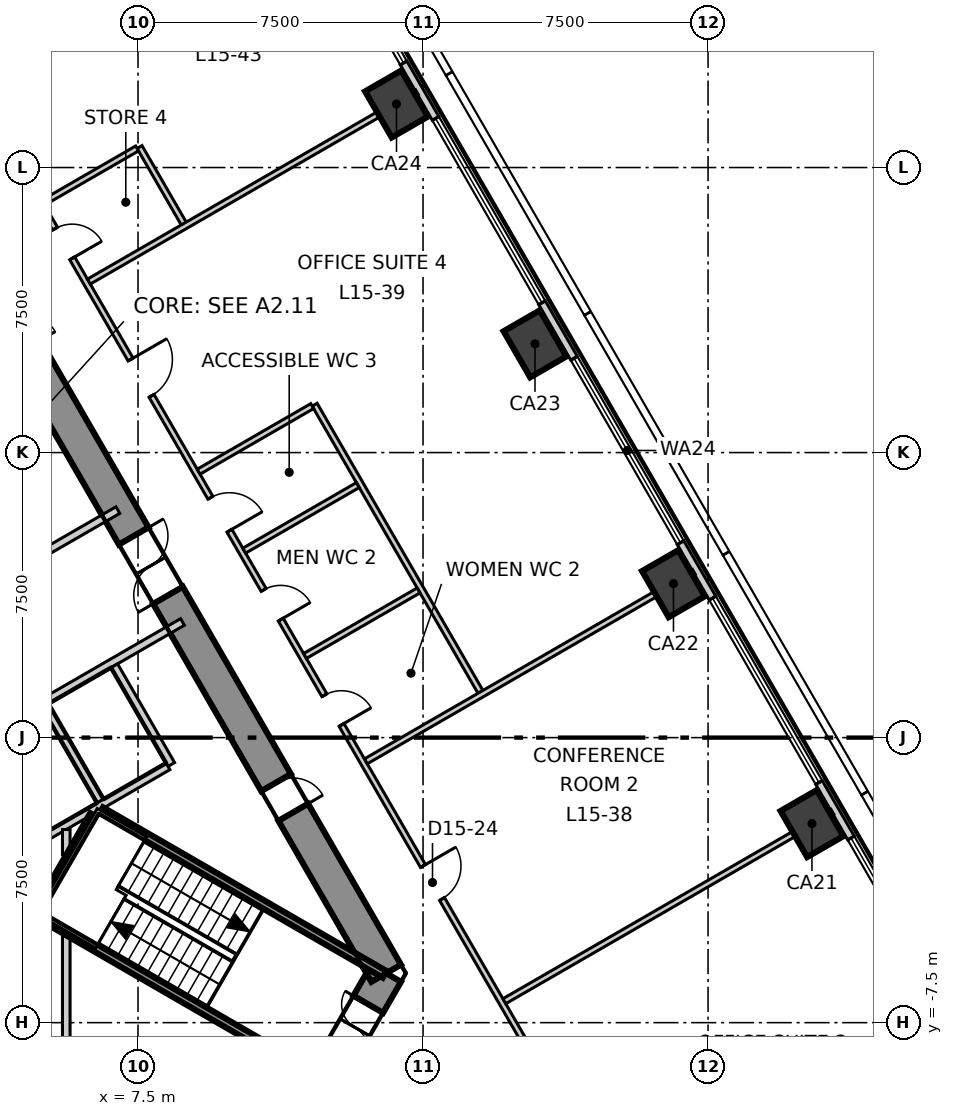
"""IFC4 building model, lengths in metres.
Left out: names, types, materials, properties, quantities, classifications, styles, units other than length and angle.
Written with IfcOpenShell. Run it as: python <this file> out.ifc"""

import sys

from ifc_helpers import new_model, si_unit, direction, frame, frame_2d, origin, origin_2d, place, context, subcontext, project, spatial, polyline, rectangle, outline, extrude, element, fill, save


model = new_model("IFC4")
c1 = context("Model", 3, precision=1e-05, world=origin(), true_north=direction((0.0, 1.0)))
c2 = subcontext(c1, "Body", "Model", "MODEL_VIEW")
j1 = project(units=[si_unit("LENGTHUNIT", "METRE"), si_unit("PLANEANGLEUNIT", "RADIAN")], contexts=[c1])
p1 = place(None, origin())
s1 = spatial("IfcSite", under=j1, at=p1, CompositionType="ELEMENT")
p2 = place(p1, origin())
s2 = spatial("IfcBuilding", under=s1, at=p2, CompositionType="ELEMENT")
p3 = place(p2, frame((0.0, 0.0, 71.3)))
s3 = spatial("IfcBuildingStorey", under=s2, at=p3, CompositionType="ELEMENT", Elevation=71.3)
p4 = place(p3, frame((12.384, -9.05, -0.3), z_axis=(0.0, 0.0, 1.0), x_axis=(0.500111984565, 0.865960739811, 0.0)))
e1 = element("IfcWall", 1, at=p4, inside=s3, PredefinedType="SHEAR", context=c2, shape_type="SweptSolid", body=[
    extrude(outline(polyline([(-0.26, -0.45), (1.646, -0.449), (3.551, -0.449), (3.031, 0.45), (1.646, 0.45), (0.26, 0.45), (-0.26, -0.45)])), origin(), (0.0, 0.0, 1.0), 4.0),
])
p5 = place(p4, frame((0.946, 0.0, 0.3)))
e2 = element("IfcOpeningElement", 2, at=p5, cuts=e1, PredefinedType="OPENING", context=c2, shape_type="SweptSolid", body=[
    extrude(rectangle(XDim=1.4, YDim=2.1, at=frame_2d((0.7, 1.05))), frame((0.0, 0.46, 0.0), z_axis=(0.0, -1.0, 0.0), x_axis=(1.0, 0.0, 0.0)), (0.0, 0.0, 1.0), 0.92),
])
p6 = place(p3, frame((14.03, -6.2, -0.3), z_axis=(0.0, 0.0, 1.0), x_axis=(-0.500026485275, 0.866010111964, 0.0)))
e3 = element("IfcWall", 3, at=p6, inside=s3, PredefinedType="SHEAR", context=c2, shape_type="SweptSolid", body=[
    extrude(outline(polyline([(-0.26, -0.449), (1.685, -0.449), (3.63, -0.449), (5.576, -0.449), (7.521, -0.449), (9.466, -0.449), (11.411, -0.449), (13.357, -0.449), (15.302, -0.449), (17.247, -0.45), (19.192, -0.45), (21.138, -0.45), (23.083, -0.45), (25.028, -0.45), (24.509, 0.449), (22.644, 0.449), (20.778, 0.449), (18.913, 0.449), (17.048, 0.449), (15.182, 0.449), (13.317, 0.449), (11.452, 0.449), (9.587, 0.449), (7.721, 0.45), (5.856, 0.45), (3.991, 0.45), (2.125, 0.45), (0.26, 0.45), (-0.26, -0.449)])), origin(), (0.0, 0.0, 1.0), 4.0),
])
p7 = place(p6, frame((11.484, 0.0, 0.3)))
e4 = element("IfcOpeningElement", 4, at=p7, cuts=e3, PredefinedType="OPENING", context=c2, shape_type="SweptSolid", body=[
    extrude(rectangle(XDim=1.8, YDim=2.1, at=frame_2d((0.9, 1.05))), frame((0.0, 0.46, 0.0), z_axis=(0.0, -1.0, 0.0), x_axis=(1.0, 0.0, 0.0)), (0.0, 0.0, 1.0), 0.92),
])
p8 = place(p6, frame((4.892, 0.0, 0.3)))
e5 = element("IfcOpeningElement", 5, at=p8, cuts=e3, PredefinedType="OPENING", context=c2, shape_type="SweptSolid", body=[
    extrude(rectangle(XDim=0.9, YDim=2.1, at=frame_2d((0.45, 1.05))), frame((0.0, 0.46, 0.0), z_axis=(0.0, -1.0, 0.0), x_axis=(1.0, 0.0, 0.0)), (0.0, 0.0, 1.0), 0.92),
])
p9 = place(p6, frame((18.976, 0.0, 0.3)))
e6 = element("IfcOpeningElement", 6, at=p9, cuts=e3, PredefinedType="OPENING", context=c2, shape_type="SweptSolid", body=[
    extrude(rectangle(XDim=0.9, YDim=2.1, at=frame_2d((0.45, 1.05))), frame((0.0, 0.46, 0.0), z_axis=(0.0, -1.0, 0.0), x_axis=(1.0, 0.0, 0.0)), (0.0, 0.0, 1.0), 0.92),
])
for number, where, z_axis, x_axis in (
    (7, (25.234, -2.262, -0.3), (0.0, 0.0, 1.0), (-0.5, 0.866, 0.0)),
    (8, (21.59, 4.05, -0.3), (0.0, 0.0, 1.0), (-0.5, 0.866, 0.0)),
    (9, (17.946, 10.361, -0.3), (0.0, 0.0, 1.0), (-0.5, 0.866, 0.0)),
    (10, (14.302, 16.672, -0.3), (0.0, 0.0, 1.0), (-0.5, 0.866, 0.0)),
):
    element("IfcColumn", number, at=place(p3, frame(where, z_axis=z_axis, x_axis=x_axis)), inside=s3, PredefinedType="COLUMN", context=c2, shape_type="SweptSolid", body=[
        extrude(rectangle(XDim=1.4, YDim=1.1, at=origin_2d()), origin(), (0.0, 0.0, 1.0), 4.0),
    ])
p10 = place(p3, frame((33.779, -15.662, 0.0), z_axis=(0.0, 0.0, 1.0), x_axis=(-0.500000131003, 0.86602532815, 0.0)))
e11 = element("IfcWall", 11, at=p10, inside=s3, PredefinedType="ELEMENTEDWALL", context=c2, shape_type="SweptSolid", body=[
    extrude(rectangle(XDim=60.886, YDim=0.2, at=frame_2d((30.443, 0.0))), origin(), (0.0, 0.0, 1.0), 3.7),
])
p11 = place(p10, frame((2.147, 0.0, 0.9)))
e12 = element("IfcOpeningElement", 12, at=p11, cuts=e11, PredefinedType="OPENING", context=c2, shape_type="SweptSolid", body=[
    extrude(rectangle(XDim=5.6, YDim=2.5, at=frame_2d((2.8, 1.25))), frame((0.0, 0.11, 0.0), z_axis=(0.0, -1.0, 0.0), x_axis=(1.0, 0.0, 0.0)), (0.0, 0.0, 1.0), 0.22),
])
p12 = place(p10, frame((9.434, 0.0, 0.9)))
e13 = element("IfcOpeningElement", 13, at=p12, cuts=e11, PredefinedType="OPENING", context=c2, shape_type="SweptSolid", body=[
    extrude(rectangle(XDim=5.6, YDim=2.5, at=frame_2d((2.8, 1.25))), frame((0.0, 0.11, 0.0), z_axis=(0.0, -1.0, 0.0), x_axis=(1.0, 0.0, 0.0)), (0.0, 0.0, 1.0), 0.22),
])
p13 = place(p10, frame((16.722, 0.0, 0.9)))
e14 = element("IfcOpeningElement", 14, at=p13, cuts=e11, PredefinedType="OPENING", context=c2, shape_type="SweptSolid", body=[
    extrude(rectangle(XDim=5.6, YDim=2.5, at=frame_2d((2.8, 1.25))), frame((0.0, 0.11, 0.0), z_axis=(0.0, -1.0, 0.0), x_axis=(1.0, 0.0, 0.0)), (0.0, 0.0, 1.0), 0.22),
])
p14 = place(p10, frame((24.009, 0.0, 0.9)))
e15 = element("IfcOpeningElement", 15, at=p14, cuts=e11, PredefinedType="OPENING", context=c2, shape_type="SweptSolid", body=[
    extrude(rectangle(XDim=5.6, YDim=2.5, at=frame_2d((2.8, 1.25))), frame((0.0, 0.11, 0.0), z_axis=(0.0, -1.0, 0.0), x_axis=(1.0, 0.0, 0.0)), (0.0, 0.0, 1.0), 0.22),
])
p15 = place(p10, frame((31.297, 0.0, 0.9)))
e16 = element("IfcOpeningElement", 16, at=p15, cuts=e11, PredefinedType="OPENING", context=c2, shape_type="SweptSolid", body=[
    extrude(rectangle(XDim=5.6, YDim=2.5, at=frame_2d((2.8, 1.25))), frame((0.0, 0.11, 0.0), z_axis=(0.0, -1.0, 0.0), x_axis=(1.0, 0.0, 0.0)), (0.0, 0.0, 1.0), 0.22),
])
p16 = place(p10, frame((38.584, 0.0, 0.9)))
e17 = element("IfcOpeningElement", 17, at=p16, cuts=e11, PredefinedType="OPENING", context=c2, shape_type="SweptSolid", body=[
    extrude(rectangle(XDim=5.6, YDim=2.5, at=frame_2d((2.8, 1.25))), frame((0.0, 0.11, 0.0), z_axis=(0.0, -1.0, 0.0), x_axis=(1.0, 0.0, 0.0)), (0.0, 0.0, 1.0), 0.22),
])
p17 = place(p10, frame((45.872, 0.0, 0.9)))
e18 = element("IfcOpeningElement", 18, at=p17, cuts=e11, PredefinedType="OPENING", context=c2, shape_type="SweptSolid", body=[
    extrude(rectangle(XDim=5.6, YDim=2.5, at=frame_2d((2.8, 1.25))), frame((0.0, 0.11, 0.0), z_axis=(0.0, -1.0, 0.0), x_axis=(1.0, 0.0, 0.0)), (0.0, 0.0, 1.0), 0.22),
])
p18 = place(p10, frame((53.16, 0.0, 0.9)))
e19 = element("IfcOpeningElement", 19, at=p18, cuts=e11, PredefinedType="OPENING", context=c2, shape_type="SweptSolid", body=[
    extrude(rectangle(XDim=5.6, YDim=2.5, at=frame_2d((2.8, 1.25))), frame((0.0, 0.11, 0.0), z_axis=(0.0, -1.0, 0.0), x_axis=(1.0, 0.0, 0.0)), (0.0, 0.0, 1.0), 0.22),
])
p19 = place(p3, frame((0.075, 22.47, 0.0), z_axis=(0.0, 0.0, 1.0), x_axis=(0.500002280369, -0.866024087209, 0.0)))
e20 = element("IfcWall", 20, at=p19, inside=s3, PredefinedType="PARTITIONING", context=c2, shape_type="SweptSolid", body=[
    extrude(rectangle(XDim=38.844, YDim=0.15, at=frame_2d((19.422, 0.0))), origin(), (0.0, 0.0, 1.0), 3.7),
])
p20 = place(p19, frame((35.944, 0.0, 0.0)))
e21 = element("IfcOpeningElement", 21, at=p20, cuts=e20, PredefinedType="OPENING", context=c2, shape_type="SweptSolid", body=[
    extrude(rectangle(XDim=1.1, YDim=2.1, at=frame_2d((0.55, 1.05))), frame((0.0, 0.085, 0.0), z_axis=(0.0, -1.0, 0.0), x_axis=(1.0, 0.0, 0.0)), (0.0, 0.0, 1.0), 0.17),
])
p21 = place(p19, frame((29.848, 0.0, 0.0)))
e22 = element("IfcOpeningElement", 22, at=p21, cuts=e20, PredefinedType="OPENING", context=c2, shape_type="SweptSolid", body=[
    extrude(rectangle(XDim=1.0, YDim=2.1, at=frame_2d((0.5, 1.05))), frame((0.0, 0.085, 0.0), z_axis=(0.0, -1.0, 0.0), x_axis=(1.0, 0.0, 0.0)), (0.0, 0.0, 1.0), 0.17),
])
p22 = place(p19, frame((14.46, 0.0, 0.0)))
e23 = element("IfcOpeningElement", 23, at=p22, cuts=e20, PredefinedType="OPENING", context=c2, shape_type="SweptSolid", body=[
    extrude(rectangle(XDim=1.1, YDim=2.1, at=frame_2d((0.55, 1.05))), frame((0.0, 0.085, 0.0), z_axis=(0.0, -1.0, 0.0), x_axis=(1.0, 0.0, 0.0)), (0.0, 0.0, 1.0), 0.17),
])
p23 = place(p19, frame((24.66, 0.0, 0.0)))
e24 = element("IfcOpeningElement", 24, at=p23, cuts=e20, PredefinedType="OPENING", context=c2, shape_type="SweptSolid", body=[
    extrude(rectangle(XDim=0.9, YDim=2.1, at=frame_2d((0.45, 1.05))), frame((0.0, 0.085, 0.0), z_axis=(0.0, -1.0, 0.0), x_axis=(1.0, 0.0, 0.0)), (0.0, 0.0, 1.0), 0.17),
])
p24 = place(p19, frame((21.46, 0.0, 0.0)))
e25 = element("IfcOpeningElement", 25, at=p24, cuts=e20, PredefinedType="OPENING", context=c2, shape_type="SweptSolid", body=[
    extrude(rectangle(XDim=0.9, YDim=2.1, at=frame_2d((0.45, 1.05))), frame((0.0, 0.085, 0.0), z_axis=(0.0, -1.0, 0.0), x_axis=(1.0, 0.0, 0.0)), (0.0, 0.0, 1.0), 0.17),
])
p25 = place(p19, frame((18.66, 0.0, 0.0)))
e26 = element("IfcOpeningElement", 26, at=p25, cuts=e20, PredefinedType="OPENING", context=c2, shape_type="SweptSolid", body=[
    extrude(rectangle(XDim=1.0, YDim=2.1, at=frame_2d((0.5, 1.05))), frame((0.0, 0.085, 0.0), z_axis=(0.0, -1.0, 0.0), x_axis=(1.0, 0.0, 0.0)), (0.0, 0.0, 1.0), 0.17),
])
p26 = place(p19, frame((6.785, 0.0, 0.0)))
e27 = element("IfcOpeningElement", 27, at=p26, cuts=e20, PredefinedType="OPENING", context=c2, shape_type="SweptSolid", body=[
    extrude(rectangle(XDim=1.0, YDim=2.1, at=frame_2d((0.5, 1.05))), frame((0.0, 0.085, 0.0), z_axis=(0.0, -1.0, 0.0), x_axis=(1.0, 0.0, 0.0)), (0.0, 0.0, 1.0), 0.17),
])
p27 = place(p19, frame((10.485, 0.0, 0.0)))
e28 = element("IfcOpeningElement", 28, at=p27, cuts=e20, PredefinedType="OPENING", context=c2, shape_type="SweptSolid", body=[
    extrude(rectangle(XDim=0.9, YDim=2.1, at=frame_2d((0.45, 1.05))), frame((0.0, 0.085, 0.0), z_axis=(0.0, -1.0, 0.0), x_axis=(1.0, 0.0, 0.0)), (0.0, 0.0, 1.0), 0.17),
])
p28 = place(p19, frame((1.796, 0.0, 0.0)))
e29 = element("IfcOpeningElement", 29, at=p28, cuts=e20, PredefinedType="OPENING", context=c2, shape_type="SweptSolid", body=[
    extrude(rectangle(XDim=1.1, YDim=2.1, at=frame_2d((0.55, 1.05))), frame((0.0, 0.085, 0.0), z_axis=(0.0, -1.0, 0.0), x_axis=(1.0, 0.0, 0.0)), (0.0, 0.0, 1.0), 0.17),
])
p29 = place(p3, frame((7.54, 15.54, 0.0), z_axis=(0.0, 0.0, 1.0), x_axis=(0.499988999718, -0.866031754707, 0.0)))
e30 = element("IfcWall", 30, at=p29, inside=s3, PredefinedType="PARTITIONING", context=c2, shape_type="SweptSolid", body=[
    extrude(rectangle(XDim=2.326, YDim=0.15, at=frame_2d((1.163, 0.0))), origin(), (0.0, 0.0, 1.0), 3.7),
])
p30 = place(p3, frame((5.007, 14.077, 0.0), z_axis=(0.0, 0.0, 1.0), x_axis=(0.866090043625, 0.499888023795, 0.0)))
e31 = element("IfcWall", 31, at=p30, inside=s3, PredefinedType="PARTITIONING", context=c2, shape_type="SweptSolid", body=[
    extrude(rectangle(XDim=2.851, YDim=0.15, at=frame_2d((1.425, 0.0))), origin(), (0.0, 0.0, 1.0), 3.7),
])
p31 = place(p3, frame((6.207, 11.999, 0.0), z_axis=(0.0, 0.0, 1.0), x_axis=(0.866061182393, 0.499938024511, 0.0)))
e32 = element("IfcWall", 32, at=p31, inside=s3, PredefinedType="PARTITIONING", context=c2, shape_type="SweptSolid", body=[
    extrude(rectangle(XDim=9.967, YDim=0.15, at=frame_2d((4.983, 0.0))), origin(), (0.0, 0.0, 1.0), 3.7),
])
p32 = place(p3, frame((12.148, 8.76, 0.0), z_axis=(0.0, 0.0, 1.0), x_axis=(0.499970334739, -0.866042530354, 0.0)))
e33 = element("IfcWall", 33, at=p32, inside=s3, PredefinedType="PARTITIONING", context=c2, shape_type="SweptSolid", body=[
    extrude(rectangle(XDim=8.725, YDim=0.15, at=frame_2d((4.362, 0.0))), origin(), (0.0, 0.0, 1.0), 3.7),
])
for number, where, z_axis, x_axis in (
    (34, (9.095, 6.997, 0.0), (0.0, 0.0, 1.0), (0.866, 0.5, 0.0)),
    (35, (10.295, 4.919, 0.0), (0.0, 0.0, 1.0), (0.866, 0.5, 0.0)),
    (36, (11.895, 2.148, 0.0), (0.0, 0.0, 1.0), (0.866, 0.5, 0.0)),
):
    element("IfcWall", number, at=place(p3, frame(where, z_axis=z_axis, x_axis=x_axis)), inside=s3, PredefinedType="PARTITIONING", context=c2, shape_type="SweptSolid", body=[
        extrude(rectangle(XDim=3.45, YDim=0.15, at=frame_2d((1.725, 0.0))), origin(), (0.0, 0.0, 1.0), 3.7),
    ])
p33 = place(p3, frame((13.495, -0.624, 0.0), z_axis=(0.0, 0.0, 1.0), x_axis=(0.866002028202, 0.500040485511, 0.0)))
e37 = element("IfcWall", 37, at=p33, inside=s3, PredefinedType="PARTITIONING", context=c2, shape_type="SweptSolid", body=[
    extrude(rectangle(XDim=9.968, YDim=0.15, at=frame_2d((4.984, 0.0))), origin(), (0.0, 0.0, 1.0), 3.7),
])
p34 = place(p3, frame((17.139, -6.936, 0.0), z_axis=(0.0, 0.0, 1.0), x_axis=(0.866008152443, 0.500029879009, 0.0)))
e38 = element("IfcWall", 38, at=p34, inside=s3, PredefinedType="PARTITIONING", context=c2, shape_type="SweptSolid", body=[
    extrude(rectangle(XDim=9.968, YDim=0.15, at=frame_2d((4.984, 0.0))), origin(), (0.0, 0.0, 1.0), 3.7),
])
p35 = place(p3, frame((1.578, 2.874, 0.0), z_axis=(0.0, 0.0, 1.0), x_axis=(0.866031483044, 0.499989470266, 0.0)))
e39 = element("IfcWall", 39, at=p35, inside=s3, PredefinedType="SOLIDWALL", context=c2, shape_type="SweptSolid", body=[
    extrude(rectangle(XDim=6.226, YDim=0.2, at=frame_2d((3.113, 0.0))), origin(), (0.0, 0.0, 1.0), 3.7),
])
p36 = place(p35, frame((2.496, 0.0, 0.0)))
e40 = element("IfcOpeningElement", 40, at=p36, cuts=e39, PredefinedType="OPENING", context=c2, shape_type="SweptSolid", body=[
    extrude(rectangle(XDim=1.1, YDim=2.1, at=frame_2d((0.55, 1.05))), frame((0.0, 0.11, 0.0), z_axis=(0.0, -1.0, 0.0), x_axis=(1.0, 0.0, 0.0)), (0.0, 0.0, 1.0), 0.22),
])
p37 = place(p3, frame((3.278, -0.071, 0.0), z_axis=(0.0, 0.0, 1.0), x_axis=(0.865953757655, 0.500124074208, 0.0)))
e41 = element("IfcWall", 41, at=p37, inside=s3, PredefinedType="SOLIDWALL", context=c2, shape_type="SweptSolid", body=[
    extrude(rectangle(XDim=6.227, YDim=0.2, at=frame_2d((3.113, 0.0))), origin(), (0.0, 0.0, 1.0), 3.7),
])
p38 = place(p3, frame((6.876, 1.891, 0.0), z_axis=(0.0, 0.0, 1.0), x_axis=(0.499990139034, -0.866031096941, 0.0)))
e42 = element("IfcWall", 42, at=p38, inside=s3, PredefinedType="SOLIDWALL", context=c2, shape_type="SweptSolid", body=[
    extrude(rectangle(XDim=3.0, YDim=0.2, at=frame_2d((1.5, 0.0))), origin(), (0.0, 0.0, 1.0), 3.7),
])
p39 = place(p3, frame((5.057, 0.841, 0.0), z_axis=(0.0, 0.0, 1.0), x_axis=(0.50012328804, -0.865954211699, 0.0)))
e43 = element("IfcWall", 43, at=p39, inside=s3, PredefinedType="SOLIDWALL", context=c2, shape_type="SweptSolid", body=[
    extrude(rectangle(XDim=2.9, YDim=0.2, at=frame_2d((1.45, 0.0))), origin(), (0.0, 0.0, 1.0), 3.7),
])
p40 = place(p3, frame((4.9, -2.714, 0.0), z_axis=(0.0, 0.0, 1.0), x_axis=(0.865992350556, 0.500057245502, 0.0)))
e44 = element("IfcWall", 44, at=p40, inside=s3, PredefinedType="SOLIDWALL", context=c2, shape_type="SweptSolid", body=[
    extrude(rectangle(XDim=3.914, YDim=0.2, at=frame_2d((1.957, 0.0))), origin(), (0.0, 0.0, 1.0), 3.7),
])
p41 = place(p3, frame((5.612, -9.03, 0.0), z_axis=(0.0, 0.0, 1.0), x_axis=(0.0, 1.0, 0.0)))
e45 = element("IfcWall", 45, at=p41, inside=s3, PredefinedType="SOLIDWALL", context=c2, shape_type="SweptSolid", body=[
    extrude(rectangle(XDim=3.827, YDim=0.2, at=frame_2d((1.914, 0.0))), origin(), (0.0, 0.0, 1.0), 3.7),
])
p42 = place(p3, frame((5.612, -3.08, 0.0), z_axis=(0.0, 0.0, 1.0), x_axis=(0.0, 1.0, 0.0)))
e46 = element("IfcWall", 46, at=p42, inside=s3, PredefinedType="SOLIDWALL", context=c2, shape_type="SweptSolid", body=[
    extrude(rectangle(XDim=0.662, YDim=0.2, at=frame_2d((0.331, 0.0))), origin(), (0.0, 0.0, 1.0), 3.7),
])
p43 = place(p3, frame((4.929, -4.693, 0.0), z_axis=(0.0, 0.0, 1.0), x_axis=(0.866010975815, -0.500024989144, 0.0)))
e47 = element("IfcWall", 47, at=p43, inside=s3, PredefinedType="SOLIDWALL", context=c2, shape_type="SweptSolid", body=[
    extrude(rectangle(XDim=8.615, YDim=0.2, at=frame_2d((4.308, 0.0))), origin(), (0.0, 0.0, 1.0), 3.7),
])
p44 = place(p3, frame((4.929, -4.462, 0.0), z_axis=(0.0, 0.0, 1.0), x_axis=(0.500200581029, 0.865909567298, 0.0)))
e48 = element("IfcWall", 48, at=p44, inside=s3, PredefinedType="SOLIDWALL", context=c2, shape_type="SweptSolid", body=[
    extrude(rectangle(XDim=2.799, YDim=0.2, at=frame_2d((1.399, 0.0))), origin(), (0.0, 0.0, 1.0), 3.7),
])
p45 = place(p3, frame((6.529, -1.922, 0.0), z_axis=(0.0, 0.0, 1.0), x_axis=(0.866060059011, -0.499939970583, 0.0)))
e49 = element("IfcWall", 49, at=p45, inside=s3, PredefinedType="SOLIDWALL", context=c2, shape_type="SweptSolid", body=[
    extrude(rectangle(XDim=8.615, YDim=0.2, at=frame_2d((4.307, 0.0))), origin(), (0.0, 0.0, 1.0), 3.7),
])
p46 = place(p12, origin())
e50 = element("IfcWindow", 50, at=p46, inside=s3, PartitioningType="SINGLE_PANEL", PredefinedType="WINDOW", context=c2, shape_type="SweptSolid", body=[
    extrude(rectangle(XDim=5.6, YDim=2.5, at=frame_2d((2.8, 1.25))), frame((0.0, 0.03, 0.0), z_axis=(0.0, -1.0, 0.0), x_axis=(1.0, 0.0, 0.0)), (0.0, 0.0, 1.0), 0.06),
])
fill(e13, e50)
p47 = place(p13, origin())
e51 = element("IfcWindow", 51, at=p47, inside=s3, PartitioningType="SINGLE_PANEL", PredefinedType="WINDOW", context=c2, shape_type="SweptSolid", body=[
    extrude(rectangle(XDim=5.6, YDim=2.5, at=frame_2d((2.8, 1.25))), frame((0.0, 0.03, 0.0), z_axis=(0.0, -1.0, 0.0), x_axis=(1.0, 0.0, 0.0)), (0.0, 0.0, 1.0), 0.06),
])
fill(e14, e51)
p48 = place(p14, origin())
e52 = element("IfcWindow", 52, at=p48, inside=s3, PartitioningType="SINGLE_PANEL", PredefinedType="WINDOW", context=c2, shape_type="SweptSolid", body=[
    extrude(rectangle(XDim=5.6, YDim=2.5, at=frame_2d((2.8, 1.25))), frame((0.0, 0.03, 0.0), z_axis=(0.0, -1.0, 0.0), x_axis=(1.0, 0.0, 0.0)), (0.0, 0.0, 1.0), 0.06),
])
fill(e15, e52)
p49 = place(p15, origin())
e53 = element("IfcWindow", 53, at=p49, inside=s3, PartitioningType="SINGLE_PANEL", PredefinedType="WINDOW", context=c2, shape_type="SweptSolid", body=[
    extrude(rectangle(XDim=5.6, YDim=2.5, at=frame_2d((2.8, 1.25))), frame((0.0, 0.03, 0.0), z_axis=(0.0, -1.0, 0.0), x_axis=(1.0, 0.0, 0.0)), (0.0, 0.0, 1.0), 0.06),
])
fill(e16, e53)
p50 = place(p16, origin())
e54 = element("IfcWindow", 54, at=p50, inside=s3, PartitioningType="SINGLE_PANEL", PredefinedType="WINDOW", context=c2, shape_type="SweptSolid", body=[
    extrude(rectangle(XDim=5.6, YDim=2.5, at=frame_2d((2.8, 1.25))), frame((0.0, 0.03, 0.0), z_axis=(0.0, -1.0, 0.0), x_axis=(1.0, 0.0, 0.0)), (0.0, 0.0, 1.0), 0.06),
])
fill(e17, e54)
p51 = place(p21, origin())
e55 = element("IfcDoor", 55, at=p51, inside=s3, OperationType="SINGLE_SWING_RIGHT", PredefinedType="DOOR", context=c2, shape_type="SweptSolid", body=[
    extrude(rectangle(XDim=1.0, YDim=2.1, at=frame_2d((0.5, 1.05))), frame((0.0, 0.025, 0.0), z_axis=(0.0, -1.0, 0.0), x_axis=(1.0, 0.0, 0.0)), (0.0, 0.0, 1.0), 0.05),
])
fill(e22, e55)
p52 = place(p22, origin())
e56 = element("IfcDoor", 56, at=p52, inside=s3, OperationType="SINGLE_SWING_RIGHT", PredefinedType="DOOR", context=c2, shape_type="SweptSolid", body=[
    extrude(rectangle(XDim=1.1, YDim=2.1, at=frame_2d((0.55, 1.05))), frame((0.0, 0.025, 0.0), z_axis=(0.0, -1.0, 0.0), x_axis=(1.0, 0.0, 0.0)), (0.0, 0.0, 1.0), 0.05),
])
fill(e23, e56)
p53 = place(p23, origin())
e57 = element("IfcDoor", 57, at=p53, inside=s3, OperationType="SINGLE_SWING_LEFT", PredefinedType="DOOR", context=c2, shape_type="SweptSolid", body=[
    extrude(rectangle(XDim=0.9, YDim=2.1, at=frame_2d((0.45, 1.05))), frame((0.0, 0.025, 0.0), z_axis=(0.0, -1.0, 0.0), x_axis=(1.0, 0.0, 0.0)), (0.0, 0.0, 1.0), 0.05),
])
fill(e24, e57)
p54 = place(p24, origin())
e58 = element("IfcDoor", 58, at=p54, inside=s3, OperationType="SINGLE_SWING_LEFT", PredefinedType="DOOR", context=c2, shape_type="SweptSolid", body=[
    extrude(rectangle(XDim=0.9, YDim=2.1, at=frame_2d((0.45, 1.05))), frame((0.0, 0.025, 0.0), z_axis=(0.0, -1.0, 0.0), x_axis=(1.0, 0.0, 0.0)), (0.0, 0.0, 1.0), 0.05),
])
fill(e25, e58)
p55 = place(p25, origin())
e59 = element("IfcDoor", 59, at=p55, inside=s3, OperationType="SINGLE_SWING_LEFT", PredefinedType="DOOR", context=c2, shape_type="SweptSolid", body=[
    extrude(rectangle(XDim=1.0, YDim=2.1, at=frame_2d((0.5, 1.05))), frame((0.0, 0.025, 0.0), z_axis=(0.0, -1.0, 0.0), x_axis=(1.0, 0.0, 0.0)), (0.0, 0.0, 1.0), 0.05),
])
fill(e26, e59)
p56 = place(p27, origin())
e60 = element("IfcDoor", 60, at=p56, inside=s3, OperationType="SINGLE_SWING_LEFT", PredefinedType="DOOR", context=c2, shape_type="SweptSolid", body=[
    extrude(rectangle(XDim=0.9, YDim=2.1, at=frame_2d((0.45, 1.05))), frame((0.0, 0.025, 0.0), z_axis=(0.0, -1.0, 0.0), x_axis=(1.0, 0.0, 0.0)), (0.0, 0.0, 1.0), 0.05),
])
fill(e28, e60)
p57 = place(p7, origin())
e61 = element("IfcDoor", 61, at=p57, inside=s3, OperationType="DOUBLE_DOOR_SINGLE_SWING", PredefinedType="DOOR", context=c2, shape_type="SweptSolid", body=[
    extrude(rectangle(XDim=1.8, YDim=2.1, at=frame_2d((0.9, 1.05))), frame((0.0, 0.025, 0.0), z_axis=(0.0, -1.0, 0.0), x_axis=(1.0, 0.0, 0.0)), (0.0, 0.0, 1.0), 0.05),
])
fill(e4, e61)
p58 = place(p5, origin())
e62 = element("IfcDoor", 62, at=p58, inside=s3, OperationType="DOUBLE_DOOR_SINGLE_SWING", PredefinedType="DOOR", context=c2, shape_type="SweptSolid", body=[
    extrude(rectangle(XDim=1.4, YDim=2.1, at=frame_2d((0.7, 1.05))), frame((0.0, 0.025, 0.0), z_axis=(0.0, -1.0, 0.0), x_axis=(1.0, 0.0, 0.0)), (0.0, 0.0, 1.0), 0.05),
])
fill(e2, e62)
p59 = place(p8, origin())
e63 = element("IfcDoor", 63, at=p59, inside=s3, OperationType="SINGLE_SWING_LEFT", PredefinedType="DOOR", context=c2, shape_type="SweptSolid", body=[
    extrude(rectangle(XDim=0.9, YDim=2.1, at=frame_2d((0.45, 1.05))), frame((0.0, 0.025, 0.0), z_axis=(0.0, -1.0, 0.0), x_axis=(1.0, 0.0, 0.0)), (0.0, 0.0, 1.0), 0.05),
])
fill(e5, e63)
save(model, sys.argv[1])
